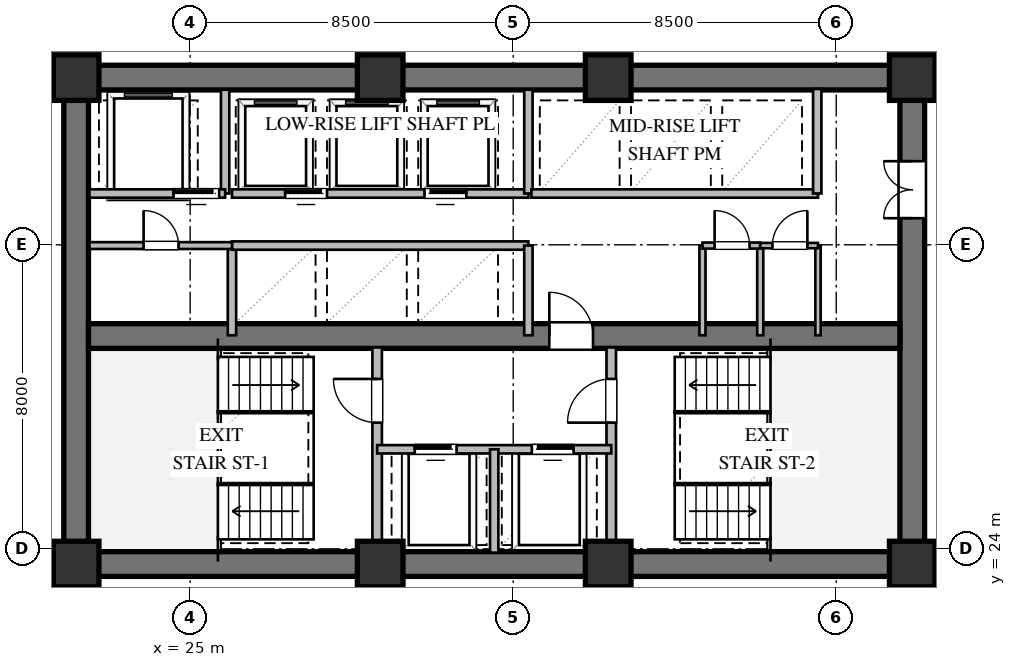
"""IFC4 building model, lengths in metres.
Left out: names, types, materials, properties, quantities, classifications, styles, units other than length and angle.
Written with IfcOpenShell. Run it as: python <this file> out.ifc"""

import sys

from ifc_helpers import new_model, si_unit, direction, frame, frame_2d, origin, origin_2d, place, context, subcontext, project, spatial, rectangle, extrude, element, fill, save


model = new_model("IFC4")
c1 = context("Model", 3, precision=1e-05, world=origin(), true_north=direction((0.0, 1.0)))
c2 = subcontext(c1, "Body", "Model", "MODEL_VIEW")
j1 = project(units=[si_unit("LENGTHUNIT", "METRE"), si_unit("PLANEANGLEUNIT", "RADIAN")], contexts=[c1])
p1 = place(None, origin())
s1 = spatial("IfcSite", under=j1, at=p1, CompositionType="ELEMENT")
p2 = place(p1, origin())
s2 = spatial("IfcBuilding", under=s1, at=p2, CompositionType="ELEMENT")
p3 = place(p2, frame((0.0, 0.0, 27.6)))
s3 = spatial("IfcBuildingStorey", under=s2, at=p3, CompositionType="ELEMENT", Elevation=27.6)
for number, where, z_axis, x_axis in (
    (1, (21.675, 23.6, 0.0), (0.0, 0.0, 1.0), (1.0, 0.0, 0.0)),
    (2, (21.675, 36.4, 0.0), (0.0, 0.0, 1.0), (1.0, 0.0, 0.0)),
):
    element("IfcWall", number, at=place(p3, frame(where, z_axis=z_axis, x_axis=x_axis)), inside=s3, PredefinedType="SHEAR", context=c2, shape_type="SweptSolid", body=[
        extrude(rectangle(XDim=22.65, YDim=0.65, at=frame_2d((11.325, 0.0))), origin(), (0.0, 0.0, 1.0), 3.36),
    ])
p4 = place(p3, frame((22.0, 23.925, 0.0), z_axis=(0.0, 0.0, 1.0), x_axis=(0.0, 1.0, 0.0)))
e3 = element("IfcWall", 3, at=p4, inside=s3, PredefinedType="SHEAR", context=c2, shape_type="SweptSolid", body=[
    extrude(rectangle(XDim=12.15, YDim=0.65, at=frame_2d((6.075, 0.0))), origin(), (0.0, 0.0, 1.0), 3.36),
])
p5 = place(p3, frame((44.0, 23.925, 0.0), z_axis=(0.0, 0.0, 1.0), x_axis=(0.0, 1.0, 0.0)))
e4 = element("IfcWall", 4, at=p5, inside=s3, PredefinedType="SHEAR", context=c2, shape_type="SweptSolid", body=[
    extrude(rectangle(XDim=12.15, YDim=0.65, at=frame_2d((6.075, 0.0))), origin(), (0.0, 0.0, 1.0), 3.36),
])
p6 = place(p5, frame((8.775, 0.0, 0.0)))
e5 = element("IfcOpeningElement", 5, at=p6, cuts=e4, PredefinedType="OPENING", context=c2, shape_type="SweptSolid", body=[
    extrude(rectangle(XDim=1.5, YDim=2.15, at=frame_2d((0.75, 1.075))), frame((0.0, 0.335, 0.0), z_axis=(0.0, -1.0, 0.0), x_axis=(1.0, 0.0, 0.0)), (0.0, 0.0, 1.0), 0.67),
])
p7 = place(p3, frame((22.325, 29.6, 0.0), z_axis=(0.0, 0.0, 1.0), x_axis=(1.0, 0.0, 0.0)))
e6 = element("IfcWall", 6, at=p7, inside=s3, PredefinedType="SHEAR", context=c2, shape_type="SweptSolid", body=[
    extrude(rectangle(XDim=21.35, YDim=0.65, at=frame_2d((10.675, 0.0))), origin(), (0.0, 0.0, 1.0), 3.36),
])
p8 = place(p7, frame((12.125, 0.0, 0.0)))
e7 = element("IfcOpeningElement", 7, at=p8, cuts=e6, PredefinedType="OPENING", context=c2, shape_type="SweptSolid", body=[
    extrude(rectangle(XDim=1.15, YDim=2.1, at=frame_2d((0.575, 1.05))), frame((0.0, 0.335, 0.0), z_axis=(0.0, -1.0, 0.0), x_axis=(1.0, 0.0, 0.0)), (0.0, 0.0, 1.0), 0.67),
])
for number, where, z_axis, x_axis in (
    (8, (22.0, 23.6, 0.0), (0.0, 0.0, 1.0), (1.0, 0.0, 0.0)),
    (9, (30.0, 23.6, 0.0), (0.0, 0.0, 1.0), (1.0, 0.0, 0.0)),
    (10, (36.0, 23.6, 0.0), (0.0, 0.0, 1.0), (1.0, 0.0, 0.0)),
    (11, (44.0, 23.6, 0.0), (0.0, 0.0, 1.0), (1.0, 0.0, 0.0)),
    (12, (44.0, 36.4, 0.0), (0.0, 0.0, 1.0), (1.0, 0.0, 0.0)),
    (13, (36.0, 36.4, 0.0), (0.0, 0.0, 1.0), (1.0, 0.0, 0.0)),
    (14, (30.0, 36.4, 0.0), (0.0, 0.0, 1.0), (1.0, 0.0, 0.0)),
    (15, (22.0, 36.4, 0.0), (0.0, 0.0, 1.0), (1.0, 0.0, 0.0)),
):
    element("IfcColumn", number, at=place(p3, frame(where, z_axis=z_axis, x_axis=x_axis)), inside=s3, PredefinedType="COLUMN", context=c2, shape_type="SweptSolid", body=[
        extrude(rectangle(XDim=1.2, YDim=1.2, at=origin_2d()), origin(), (0.0, 0.0, 1.0), 3.6),
    ])
p9 = place(p3, frame((29.92, 23.9, 0.0), z_axis=(0.0, 0.0, 1.0), x_axis=(0.0, 1.0, 0.0)))
e16 = element("IfcWall", 16, at=p9, inside=s3, PredefinedType="SOLIDWALL", context=c2, shape_type="SweptSolid", body=[
    extrude(rectangle(XDim=5.4, YDim=0.25, at=frame_2d((2.7, 0.0))), origin(), (0.0, 0.0, 1.0), 3.36),
])
p10 = place(p9, frame((3.421, 0.0, 0.0)))
e17 = element("IfcOpeningElement", 17, at=p10, cuts=e16, PredefinedType="OPENING", context=c2, shape_type="SweptSolid", body=[
    extrude(rectangle(XDim=1.15, YDim=2.1, at=frame_2d((0.575, 1.05))), frame((0.0, 0.135, 0.0), z_axis=(0.0, -1.0, 0.0), x_axis=(1.0, 0.0, 0.0)), (0.0, 0.0, 1.0), 0.27),
])
p11 = place(p3, frame((36.08, 23.9, 0.0), z_axis=(0.0, 0.0, 1.0), x_axis=(0.0, 1.0, 0.0)))
e18 = element("IfcWall", 18, at=p11, inside=s3, PredefinedType="SOLIDWALL", context=c2, shape_type="SweptSolid", body=[
    extrude(rectangle(XDim=5.4, YDim=0.25, at=frame_2d((2.7, 0.0))), origin(), (0.0, 0.0, 1.0), 3.36),
])
p12 = place(p11, frame((3.421, 0.0, 0.0)))
e19 = element("IfcOpeningElement", 19, at=p12, cuts=e18, PredefinedType="OPENING", context=c2, shape_type="SweptSolid", body=[
    extrude(rectangle(XDim=1.15, YDim=2.1, at=frame_2d((0.575, 1.05))), frame((0.0, 0.135, 0.0), z_axis=(0.0, -1.0, 0.0), x_axis=(1.0, 0.0, 0.0)), (0.0, 0.0, 1.0), 0.27),
])
p13 = place(p3, frame((29.92, 26.62, 0.0), z_axis=(0.0, 0.0, 1.0), x_axis=(1.0, 0.0, 0.0)))
e20 = element("IfcWall", 20, at=p13, inside=s3, PredefinedType="SOLIDWALL", context=c2, shape_type="SweptSolid", body=[
    extrude(rectangle(XDim=6.16, YDim=0.22, at=frame_2d((3.08, 0.0))), origin(), (0.0, 0.0, 1.0), 3.36),
])
p14 = place(p13, frame((0.99, 0.0, 0.0)))
e21 = element("IfcOpeningElement", 21, at=p14, cuts=e20, PredefinedType="OPENING", context=c2, shape_type="SweptSolid", body=[
    extrude(rectangle(XDim=1.1, YDim=2.1, at=frame_2d((0.55, 1.05))), frame((0.0, 0.12, 0.0), z_axis=(0.0, -1.0, 0.0), x_axis=(1.0, 0.0, 0.0)), (0.0, 0.0, 1.0), 0.24),
])
p15 = place(p13, frame((4.07, 0.0, 0.0)))
e22 = element("IfcOpeningElement", 22, at=p15, cuts=e20, PredefinedType="OPENING", context=c2, shape_type="SweptSolid", body=[
    extrude(rectangle(XDim=1.1, YDim=2.1, at=frame_2d((0.55, 1.05))), frame((0.0, 0.12, 0.0), z_axis=(0.0, -1.0, 0.0), x_axis=(1.0, 0.0, 0.0)), (0.0, 0.0, 1.0), 0.24),
])
p16 = place(p3, frame((33.0, 23.9, 0.0), z_axis=(0.0, 0.0, 1.0), x_axis=(0.0, 1.0, 0.0)))
e23 = element("IfcWall", 23, at=p16, inside=s3, PredefinedType="SOLIDWALL", context=c2, shape_type="SweptSolid", body=[
    extrude(rectangle(XDim=2.72, YDim=0.22, at=frame_2d((1.36, 0.0))), origin(), (0.0, 0.0, 1.0), 3.36),
])
p17 = place(p3, frame((25.92, 33.35, 0.0), z_axis=(0.0, 0.0, 1.0), x_axis=(0.0, 1.0, 0.0)))
e24 = element("IfcWall", 24, at=p17, inside=s3, PredefinedType="SOLIDWALL", context=c2, shape_type="SweptSolid", body=[
    extrude(rectangle(XDim=2.73, YDim=0.22, at=frame_2d((1.365, 0.0))), origin(), (0.0, 0.0, 1.0), 3.36),
])
p18 = place(p3, frame((22.35, 33.35, 0.0), z_axis=(0.0, 0.0, 1.0), x_axis=(1.0, 0.0, 0.0)))
e25 = element("IfcWall", 25, at=p18, inside=s3, PredefinedType="SOLIDWALL", context=c2, shape_type="SweptSolid", body=[
    extrude(rectangle(XDim=3.57, YDim=0.22, at=frame_2d((1.785, 0.0))), origin(), (0.0, 0.0, 1.0), 3.36),
])
p19 = place(p18, frame((2.213, 0.0, 0.0)))
e26 = element("IfcOpeningElement", 26, at=p19, cuts=e25, PredefinedType="OPENING", context=c2, shape_type="SweptSolid", body=[
    extrude(rectangle(XDim=1.2, YDim=2.1, at=frame_2d((0.6, 1.05))), frame((0.0, 0.12, 0.0), z_axis=(0.0, -1.0, 0.0), x_axis=(1.0, 0.0, 0.0)), (0.0, 0.0, 1.0), 0.24),
])
p20 = place(p3, frame((26.1, 29.62, 0.0), z_axis=(0.0, 0.0, 1.0), x_axis=(0.0, 1.0, 0.0)))
e27 = element("IfcWall", 27, at=p20, inside=s3, PredefinedType="SOLIDWALL", context=c2, shape_type="SweptSolid", body=[
    extrude(rectangle(XDim=2.36, YDim=0.22, at=frame_2d((1.18, 0.0))), origin(), (0.0, 0.0, 1.0), 3.36),
])
p21 = place(p3, frame((26.1, 31.98, 0.0), z_axis=(0.0, 0.0, 1.0), x_axis=(1.0, 0.0, 0.0)))
e28 = element("IfcWall", 28, at=p21, inside=s3, PredefinedType="SOLIDWALL", context=c2, shape_type="SweptSolid", body=[
    extrude(rectangle(XDim=7.8, YDim=0.22, at=frame_2d((3.9, 0.0))), origin(), (0.0, 0.0, 1.0), 3.36),
])
p22 = place(p3, frame((33.9, 29.62, 0.0), z_axis=(0.0, 0.0, 1.0), x_axis=(0.0, 1.0, 0.0)))
e29 = element("IfcWall", 29, at=p22, inside=s3, PredefinedType="SOLIDWALL", context=c2, shape_type="SweptSolid", body=[
    extrude(rectangle(XDim=2.36, YDim=0.22, at=frame_2d((1.18, 0.0))), origin(), (0.0, 0.0, 1.0), 3.36),
])
p23 = place(p3, frame((26.1, 33.35, 0.0), z_axis=(0.0, 0.0, 1.0), x_axis=(1.0, 0.0, 0.0)))
e30 = element("IfcWall", 30, at=p23, inside=s3, PredefinedType="SOLIDWALL", context=c2, shape_type="SweptSolid", body=[
    extrude(rectangle(XDim=7.8, YDim=0.22, at=frame_2d((3.9, 0.0))), origin(), (0.0, 0.0, 1.0), 3.36),
])
p24 = place(p23, frame((1.4, 0.0, 0.0)))
e31 = element("IfcOpeningElement", 31, at=p24, cuts=e30, PredefinedType="OPENING", context=c2, shape_type="SweptSolid", body=[
    extrude(rectangle(XDim=1.1, YDim=2.1, at=frame_2d((0.55, 1.05))), frame((0.0, 0.12, 0.0), z_axis=(0.0, -1.0, 0.0), x_axis=(1.0, 0.0, 0.0)), (0.0, 0.0, 1.0), 0.24),
])
p25 = place(p23, frame((5.066, 0.0, 0.0)))
e32 = element("IfcOpeningElement", 32, at=p25, cuts=e30, PredefinedType="OPENING", context=c2, shape_type="SweptSolid", body=[
    extrude(rectangle(XDim=1.1, YDim=2.1, at=frame_2d((0.55, 1.05))), frame((0.0, 0.12, 0.0), z_axis=(0.0, -1.0, 0.0), x_axis=(1.0, 0.0, 0.0)), (0.0, 0.0, 1.0), 0.24),
])
p26 = place(p3, frame((33.9, 33.35, 0.0), z_axis=(0.0, 0.0, 1.0), x_axis=(0.0, 1.0, 0.0)))
e33 = element("IfcWall", 33, at=p26, inside=s3, PredefinedType="SOLIDWALL", context=c2, shape_type="SweptSolid", body=[
    extrude(rectangle(XDim=2.73, YDim=0.22, at=frame_2d((1.365, 0.0))), origin(), (0.0, 0.0, 1.0), 3.36),
])
p27 = place(p3, frame((33.98, 33.35, 0.0), z_axis=(0.0, 0.0, 1.0), x_axis=(1.0, 0.0, 0.0)))
e34 = element("IfcWall", 34, at=p27, inside=s3, PredefinedType="SOLIDWALL", context=c2, shape_type="SweptSolid", body=[
    extrude(rectangle(XDim=7.54, YDim=0.22, at=frame_2d((3.77, 0.0))), origin(), (0.0, 0.0, 1.0), 3.36),
])
p28 = place(p3, frame((41.5, 33.35, 0.0), z_axis=(0.0, 0.0, 1.0), x_axis=(0.0, 1.0, 0.0)))
e35 = element("IfcWall", 35, at=p28, inside=s3, PredefinedType="SOLIDWALL", context=c2, shape_type="SweptSolid", body=[
    extrude(rectangle(XDim=2.75, YDim=0.22, at=frame_2d((1.375, 0.0))), origin(), (0.0, 0.0, 1.0), 3.36),
])
p29 = place(p3, frame((22.35, 31.98, 0.0), z_axis=(0.0, 0.0, 1.0), x_axis=(1.0, 0.0, 0.0)))
e36 = element("IfcWall", 36, at=p29, inside=s3, PredefinedType="PARTITIONING", context=c2, shape_type="SweptSolid", body=[
    extrude(rectangle(XDim=3.75, YDim=0.18, at=frame_2d((1.875, 0.0))), origin(), (0.0, 0.0, 1.0), 3.36),
])
p30 = place(p29, frame((1.425, 0.0, 0.0)))
e37 = element("IfcOpeningElement", 37, at=p30, cuts=e36, PredefinedType="OPENING", context=c2, shape_type="SweptSolid", body=[
    extrude(rectangle(XDim=0.92, YDim=2.1, at=frame_2d((0.46, 1.05))), frame((0.0, 0.1, 0.0), z_axis=(0.0, -1.0, 0.0), x_axis=(1.0, 0.0, 0.0)), (0.0, 0.0, 1.0), 0.2),
])
for number, where, z_axis, x_axis in (
    (38, (38.48, 29.62, 0.0), (0.0, 0.0, 1.0), (0.0, 1.0, 0.0)),
    (39, (40.0, 29.62, 0.0), (0.0, 0.0, 1.0), (0.0, 1.0, 0.0)),
):
    element("IfcWall", number, at=place(p3, frame(where, z_axis=z_axis, x_axis=x_axis)), inside=s3, PredefinedType="PLUMBINGWALL", context=c2, shape_type="SweptSolid", body=[
        extrude(rectangle(XDim=2.36, YDim=0.16, at=frame_2d((1.18, 0.0))), origin(), (0.0, 0.0, 1.0), 3.36),
    ])
p31 = place(p3, frame((41.52, 29.62, 0.0), z_axis=(0.0, 0.0, 1.0), x_axis=(0.0, 1.0, 0.0)))
e40 = element("IfcWall", 40, at=p31, inside=s3, PredefinedType="PARTITIONING", context=c2, shape_type="SweptSolid", body=[
    extrude(rectangle(XDim=2.36, YDim=0.14, at=frame_2d((1.18, 0.0))), origin(), (0.0, 0.0, 1.0), 3.36),
])
p32 = place(p3, frame((38.48, 31.98, 0.0), z_axis=(0.0, 0.0, 1.0), x_axis=(1.0, 0.0, 0.0)))
e41 = element("IfcWall", 41, at=p32, inside=s3, PredefinedType="PLUMBINGWALL", context=c2, shape_type="SweptSolid", body=[
    extrude(rectangle(XDim=1.52, YDim=0.16, at=frame_2d((0.76, 0.0))), origin(), (0.0, 0.0, 1.0), 3.36),
])
p33 = place(p32, frame((0.32, 0.0, 0.0)))
e42 = element("IfcOpeningElement", 42, at=p33, cuts=e41, PredefinedType="OPENING", context=c2, shape_type="SweptSolid", body=[
    extrude(rectangle(XDim=0.92, YDim=2.1, at=frame_2d((0.46, 1.05))), frame((0.0, 0.09, 0.0), z_axis=(0.0, -1.0, 0.0), x_axis=(1.0, 0.0, 0.0)), (0.0, 0.0, 1.0), 0.18),
])
p34 = place(p3, frame((40.0, 31.98, 0.0), z_axis=(0.0, 0.0, 1.0), x_axis=(1.0, 0.0, 0.0)))
e43 = element("IfcWall", 43, at=p34, inside=s3, PredefinedType="PARTITIONING", context=c2, shape_type="SweptSolid", body=[
    extrude(rectangle(XDim=1.52, YDim=0.14, at=frame_2d((0.76, 0.0))), origin(), (0.0, 0.0, 1.0), 3.36),
])
p35 = place(p34, frame((0.32, 0.0, 0.0)))
e44 = element("IfcOpeningElement", 44, at=p35, cuts=e43, PredefinedType="OPENING", context=c2, shape_type="SweptSolid", body=[
    extrude(rectangle(XDim=0.92, YDim=2.1, at=frame_2d((0.46, 1.05))), frame((0.0, 0.08, 0.0), z_axis=(0.0, -1.0, 0.0), x_axis=(1.0, 0.0, 0.0)), (0.0, 0.0, 1.0), 0.16),
])
p36 = place(p10, origin())
e45 = element("IfcDoor", 45, at=p36, inside=s3, OperationType="SINGLE_SWING_RIGHT", PredefinedType="DOOR", context=c2, shape_type="SweptSolid", body=[
    extrude(rectangle(XDim=1.15, YDim=2.1, at=frame_2d((0.575, 1.05))), frame((0.0, 0.025, 0.0), z_axis=(0.0, -1.0, 0.0), x_axis=(1.0, 0.0, 0.0)), (0.0, 0.0, 1.0), 0.05),
])
fill(e17, e45)
p37 = place(p12, origin())
e46 = element("IfcDoor", 46, at=p37, inside=s3, OperationType="SINGLE_SWING_LEFT", PredefinedType="DOOR", context=c2, shape_type="SweptSolid", body=[
    extrude(rectangle(XDim=1.15, YDim=2.1, at=frame_2d((0.575, 1.05))), frame((0.0, 0.025, 0.0), z_axis=(0.0, -1.0, 0.0), x_axis=(1.0, 0.0, 0.0)), (0.0, 0.0, 1.0), 0.05),
])
fill(e19, e46)
p38 = place(p14, origin())
e47 = element("IfcDoor", 47, at=p38, inside=s3, OperationType="SLIDING_TO_LEFT", PredefinedType="DOOR", context=c2, shape_type="SweptSolid", body=[
    extrude(rectangle(XDim=1.1, YDim=2.1, at=frame_2d((0.55, 1.05))), frame((0.0, 0.025, 0.0), z_axis=(0.0, -1.0, 0.0), x_axis=(1.0, 0.0, 0.0)), (0.0, 0.0, 1.0), 0.05),
])
fill(e21, e47)
p39 = place(p15, origin())
e48 = element("IfcDoor", 48, at=p39, inside=s3, OperationType="SLIDING_TO_RIGHT", PredefinedType="DOOR", context=c2, shape_type="SweptSolid", body=[
    extrude(rectangle(XDim=1.1, YDim=2.1, at=frame_2d((0.55, 1.05))), frame((0.0, 0.025, 0.0), z_axis=(0.0, -1.0, 0.0), x_axis=(1.0, 0.0, 0.0)), (0.0, 0.0, 1.0), 0.05),
])
fill(e22, e48)
p40 = place(p8, origin())
e49 = element("IfcDoor", 49, at=p40, inside=s3, OperationType="SINGLE_SWING_LEFT", PredefinedType="DOOR", context=c2, shape_type="SweptSolid", body=[
    extrude(rectangle(XDim=1.15, YDim=2.1, at=frame_2d((0.575, 1.05))), frame((0.0, 0.025, 0.0), z_axis=(0.0, -1.0, 0.0), x_axis=(1.0, 0.0, 0.0)), (0.0, 0.0, 1.0), 0.05),
])
fill(e7, e49)
p41 = place(p6, origin())
e50 = element("IfcDoor", 50, at=p41, inside=s3, OperationType="DOUBLE_DOOR_SINGLE_SWING", PredefinedType="DOOR", context=c2, shape_type="SweptSolid", body=[
    extrude(rectangle(XDim=1.5, YDim=2.15, at=frame_2d((0.75, 1.075))), frame((0.0, 0.025, 0.0), z_axis=(0.0, -1.0, 0.0), x_axis=(1.0, 0.0, 0.0)), (0.0, 0.0, 1.0), 0.05),
])
fill(e5, e50)
p42 = place(p19, origin())
e51 = element("IfcDoor", 51, at=p42, inside=s3, OperationType="SLIDING_TO_LEFT", PredefinedType="DOOR", context=c2, shape_type="SweptSolid", body=[
    extrude(rectangle(XDim=1.2, YDim=2.1, at=frame_2d((0.6, 1.05))), frame((0.0, 0.025, 0.0), z_axis=(0.0, -1.0, 0.0), x_axis=(1.0, 0.0, 0.0)), (0.0, 0.0, 1.0), 0.05),
])
fill(e26, e51)
p43 = place(p24, origin())
e52 = element("IfcDoor", 52, at=p43, inside=s3, OperationType="SLIDING_TO_LEFT", PredefinedType="DOOR", context=c2, shape_type="SweptSolid", body=[
    extrude(rectangle(XDim=1.1, YDim=2.1, at=frame_2d((0.55, 1.05))), frame((0.0, 0.025, 0.0), z_axis=(0.0, -1.0, 0.0), x_axis=(1.0, 0.0, 0.0)), (0.0, 0.0, 1.0), 0.05),
])
fill(e31, e52)
p44 = place(p25, origin())
e53 = element("IfcDoor", 53, at=p44, inside=s3, OperationType="SLIDING_TO_RIGHT", PredefinedType="DOOR", context=c2, shape_type="SweptSolid", body=[
    extrude(rectangle(XDim=1.1, YDim=2.1, at=frame_2d((0.55, 1.05))), frame((0.0, 0.025, 0.0), z_axis=(0.0, -1.0, 0.0), x_axis=(1.0, 0.0, 0.0)), (0.0, 0.0, 1.0), 0.05),
])
fill(e32, e53)
p45 = place(p30, origin())
e54 = element("IfcDoor", 54, at=p45, inside=s3, OperationType="SINGLE_SWING_LEFT", PredefinedType="DOOR", context=c2, shape_type="SweptSolid", body=[
    extrude(rectangle(XDim=0.92, YDim=2.1, at=frame_2d((0.46, 1.05))), frame((0.0, 0.025, 0.0), z_axis=(0.0, -1.0, 0.0), x_axis=(1.0, 0.0, 0.0)), (0.0, 0.0, 1.0), 0.05),
])
fill(e37, e54)
p46 = place(p33, origin())
e55 = element("IfcDoor", 55, at=p46, inside=s3, OperationType="SINGLE_SWING_LEFT", PredefinedType="DOOR", context=c2, shape_type="SweptSolid", body=[
    extrude(rectangle(XDim=0.92, YDim=2.1, at=frame_2d((0.46, 1.05))), frame((0.0, 0.025, 0.0), z_axis=(0.0, -1.0, 0.0), x_axis=(1.0, 0.0, 0.0)), (0.0, 0.0, 1.0), 0.05),
])
fill(e42, e55)
p47 = place(p35, origin())
e56 = element("IfcDoor", 56, at=p47, inside=s3, OperationType="SINGLE_SWING_RIGHT", PredefinedType="DOOR", context=c2, shape_type="SweptSolid", body=[
    extrude(rectangle(XDim=0.92, YDim=2.1, at=frame_2d((0.46, 1.05))), frame((0.0, 0.025, 0.0), z_axis=(0.0, -1.0, 0.0), x_axis=(1.0, 0.0, 0.0)), (0.0, 0.0, 1.0), 0.05),
])
fill(e44, e56)
save(model, sys.argv[1])
